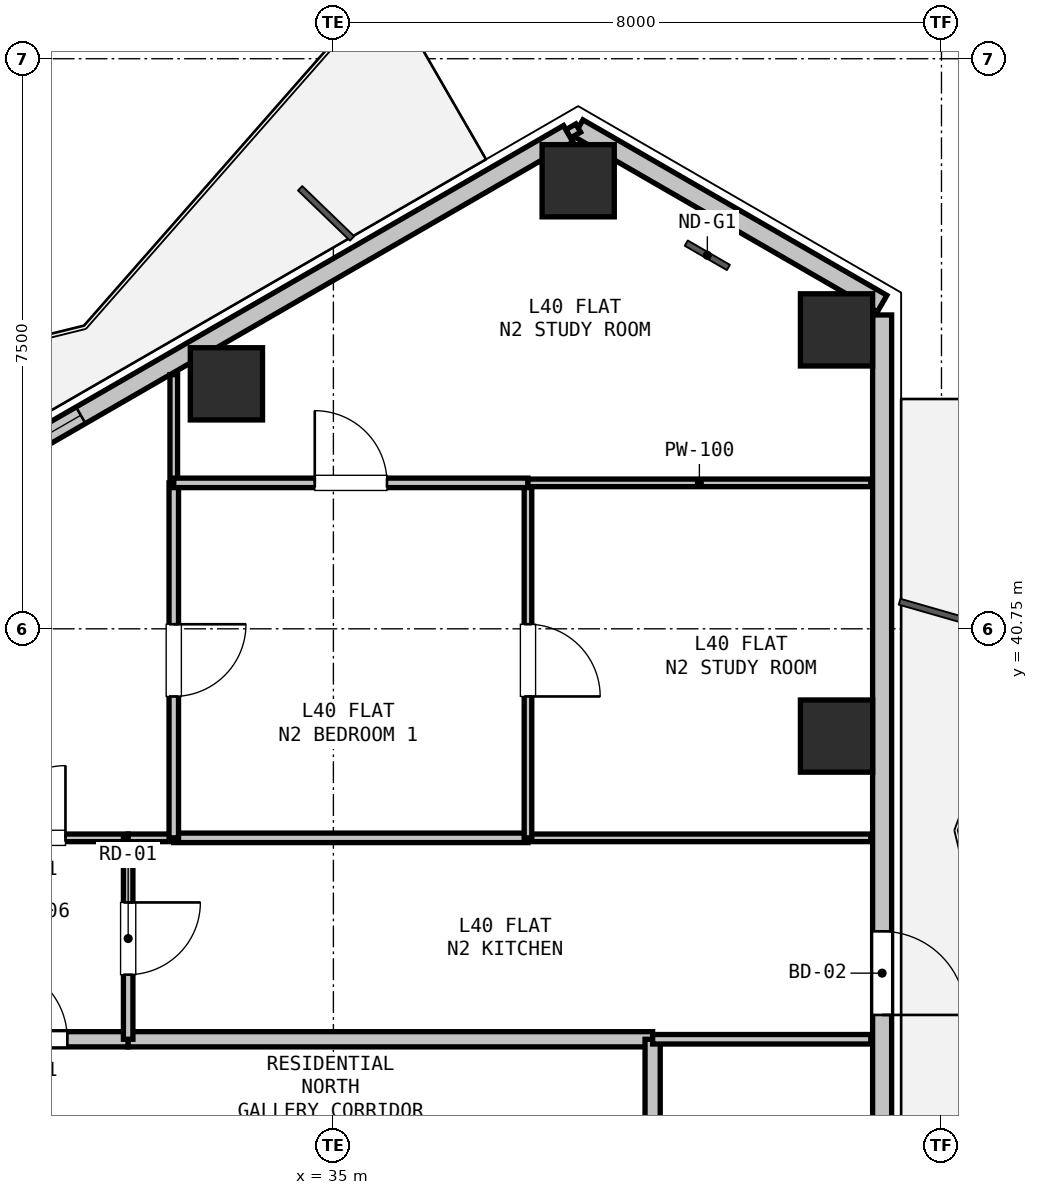
"""IFC4 building model, lengths in metres.
Left out: names, types, materials, properties, quantities, classifications, styles, units other than length and angle.
Written with IfcOpenShell. Run it as: python <this file> out.ifc"""

import sys

from ifc_helpers import new_model, si_unit, direction, frame, frame_2d, origin, origin_2d, place, context, subcontext, project, spatial, rectangle, hollow_rectangle, extrude, element, fill, save


model = new_model("IFC4")
c1 = context("Model", 3, precision=1e-05, world=origin(), true_north=direction((0.0, 1.0)))
c2 = subcontext(c1, "Body", "Model", "MODEL_VIEW")
j1 = project(units=[si_unit("LENGTHUNIT", "METRE"), si_unit("PLANEANGLEUNIT", "RADIAN")], contexts=[c1])
p1 = place(None, origin())
s1 = spatial("IfcSite", under=j1, at=p1, CompositionType="ELEMENT")
p2 = place(p1, origin())
s2 = spatial("IfcBuilding", under=s1, at=p2, CompositionType="ELEMENT")
p3 = place(p2, frame((0.0, 0.0, 144.3)))
s3 = spatial("IfcBuildingStorey", under=s2, at=p3, CompositionType="ELEMENT", Elevation=144.3)
for number, where, z_axis, x_axis in (
    (1, (33.593, 43.973, 0.0), (0.0, 0.0, 1.0), (1.0, 0.0, 0.0)),
    (2, (38.22, 46.645, 0.0), (0.0, 0.0, 1.0), (1.0, 0.0, 0.0)),
    (3, (41.619, 44.683, 0.0), (0.0, 0.0, 1.0), (1.0, 0.0, 0.0)),
    (4, (41.619, 39.339, 0.0), (0.0, 0.0, 1.0), (1.0, 0.0, 0.0)),
):
    element("IfcColumn", number, at=place(p3, frame(where, z_axis=z_axis, x_axis=x_axis)), inside=s3, PredefinedType="COLUMN", context=c2, shape_type="SweptSolid", body=[
        extrude(hollow_rectangle(XDim=0.95, YDim=0.95, WallThickness=0.028, at=origin_2d()), origin(), (0.0, 0.0, 1.0), 3.3),
    ])
p4 = place(p3, frame((38.22, 47.338, 0.0), z_axis=(0.0, 0.0, 1.0), x_axis=(0.866035021055, -0.499983342029, 0.0)))
e5 = element("IfcWall", 5, at=p4, inside=s3, PredefinedType="SOLIDWALL", context=c2, shape_type="SweptSolid", body=[
    extrude(rectangle(XDim=4.617, YDim=0.25, at=frame_2d((2.309, 0.0))), origin(), (0.0, 0.0, 1.0), 2.68),
])
p5 = place(p3, frame((28.403, 41.67, 0.0), z_axis=(0.0, 0.0, 1.0), x_axis=(0.86602239209, 0.500005216371, 0.0)))
e6 = element("IfcWall", 6, at=p5, inside=s3, PredefinedType="SOLIDWALL", context=c2, shape_type="SweptSolid", body=[
    extrude(rectangle(XDim=11.186, YDim=0.25, at=frame_2d((5.593, 0.0))), origin(), (0.0, 0.0, 1.0), 2.68),
])
p6 = place(p5, frame((2.88, 0.0, 0.9)))
e7 = element("IfcOpeningElement", 7, at=p6, cuts=e6, PredefinedType="OPENING", context=c2, shape_type="SweptSolid", body=[
    extrude(rectangle(XDim=0.9, YDim=1.4, at=frame_2d((0.45, 0.7))), frame((0.0, 0.135, 0.0), z_axis=(0.0, -1.0, 0.0), x_axis=(1.0, 0.0, 0.0)), (0.0, 0.0, 1.0), 0.27),
])
p7 = place(p3, frame((42.219, 44.879, 0.0), z_axis=(0.0, 0.0, 1.0), x_axis=(0.0, -1.0, 0.0)))
e8 = element("IfcWall", 8, at=p7, inside=s3, PredefinedType="SOLIDWALL", context=c2, shape_type="SweptSolid", body=[
    extrude(rectangle(XDim=11.186, YDim=0.25, at=frame_2d((5.593, 0.0))), origin(), (0.0, 0.0, 1.0), 2.68),
])
p8 = place(p7, frame((8.109, 0.0, 0.0)))
e9 = element("IfcOpeningElement", 9, at=p8, cuts=e8, PredefinedType="OPENING", context=c2, shape_type="SweptSolid", body=[
    extrude(rectangle(XDim=1.1, YDim=2.1, at=frame_2d((0.55, 1.05))), frame((0.0, 0.135, 0.0), z_axis=(0.0, -1.0, 0.0), x_axis=(1.0, 0.0, 0.0)), (0.0, 0.0, 1.0), 0.27),
])
p9 = place(p3, frame((29.7, 35.35, 0.0), z_axis=(0.0, 0.0, 1.0), x_axis=(1.0, 0.0, 0.0)))
e10 = element("IfcWall", 10, at=p9, inside=s3, PredefinedType="PARTITIONING", context=c2, shape_type="SweptSolid", body=[
    extrude(rectangle(XDim=2.6, YDim=0.2, at=frame_2d((1.3, 0.0))), origin(), (0.0, 0.0, 1.0), 3.06),
])
p10 = place(p9, frame((0.8, 0.0, 0.0)))
e11 = element("IfcOpeningElement", 11, at=p10, cuts=e10, PredefinedType="OPENING", context=c2, shape_type="SweptSolid", body=[
    extrude(rectangle(XDim=1.0, YDim=2.15, at=frame_2d((0.5, 1.075))), frame((0.0, 0.11, 0.0), z_axis=(0.0, -1.0, 0.0), x_axis=(1.0, 0.0, 0.0)), (0.0, 0.0, 1.0), 0.22),
])
p11 = place(p3, frame((32.3, 35.35, 0.0), z_axis=(0.0, 0.0, 1.0), x_axis=(1.0, 0.0, 0.0)))
e12 = element("IfcWall", 12, at=p11, inside=s3, PredefinedType="PARTITIONING", context=c2, shape_type="SweptSolid", body=[
    extrude(rectangle(XDim=6.9, YDim=0.2, at=frame_2d((3.45, 0.0))), origin(), (0.0, 0.0, 1.0), 2.433),
])
p12 = place(p3, frame((39.2, 35.35, 0.0), z_axis=(0.0, 0.0, 1.0), x_axis=(0.0, -1.0, 0.0)))
e13 = element("IfcWall", 13, at=p12, inside=s3, PredefinedType="PARTITIONING", context=c2, shape_type="SweptSolid", body=[
    extrude(rectangle(XDim=1.75, YDim=0.2, at=frame_2d((0.875, 0.0))), origin(), (0.0, 0.0, 1.0), 3.06),
])
p13 = place(p3, frame((29.7, 38.0, 0.0), z_axis=(0.0, 0.0, 1.0), x_axis=(1.0, 0.0, 0.0)))
e14 = element("IfcWall", 14, at=p13, inside=s3, PredefinedType="PARTITIONING", context=c2, shape_type="SweptSolid", body=[
    extrude(rectangle(XDim=2.6, YDim=0.1, at=frame_2d((1.3, 0.0))), origin(), (0.0, 0.0, 1.0), 3.06),
])
p14 = place(p13, frame((0.825, 0.0, 0.0)))
e15 = element("IfcOpeningElement", 15, at=p14, cuts=e14, PredefinedType="OPENING", context=c2, shape_type="SweptSolid", body=[
    extrude(rectangle(XDim=0.95, YDim=2.1, at=frame_2d((0.475, 1.05))), frame((0.0, 0.06, 0.0), z_axis=(0.0, -1.0, 0.0), x_axis=(1.0, 0.0, 0.0)), (0.0, 0.0, 1.0), 0.12),
])
p15 = place(p3, frame((32.3, 38.0, 0.0), z_axis=(0.0, 0.0, 1.0), x_axis=(0.0, -1.0, 0.0)))
e16 = element("IfcWall", 16, at=p15, inside=s3, PredefinedType="PARTITIONING", context=c2, shape_type="SweptSolid", body=[
    extrude(rectangle(XDim=2.65, YDim=0.125, at=frame_2d((1.325, 0.0))), origin(), (0.0, 0.0, 1.0), 3.06),
])
p16 = place(p15, frame((0.85, 0.0, 0.0)))
e17 = element("IfcOpeningElement", 17, at=p16, cuts=e16, PredefinedType="OPENING", context=c2, shape_type="SweptSolid", body=[
    extrude(rectangle(XDim=0.95, YDim=2.1, at=frame_2d((0.475, 1.05))), frame((0.0, 0.073, 0.0), z_axis=(0.0, -1.0, 0.0), x_axis=(1.0, 0.0, 0.0)), (0.0, 0.0, 1.0), 0.145),
])
p17 = place(p3, frame((42.07, 35.35, 0.0), z_axis=(0.0, 0.0, 1.0), x_axis=(-1.0, 0.0, 0.0)))
e18 = element("IfcWall", 18, at=p17, inside=s3, PredefinedType="PARTITIONING", context=c2, shape_type="SweptSolid", body=[
    extrude(rectangle(XDim=2.87, YDim=0.125, at=frame_2d((1.435, 0.0))), origin(), (0.0, 0.0, 1.0), 2.365),
])
p18 = place(p3, frame((32.3, 38.0, 0.0), z_axis=(0.0, 0.0, 1.0), x_axis=(1.0, 0.0, 0.0)))
e19 = element("IfcWall", 19, at=p18, inside=s3, PredefinedType="PARTITIONING", context=c2, shape_type="SweptSolid", body=[
    extrude(rectangle(XDim=0.6, YDim=0.1, at=frame_2d((0.3, 0.0))), origin(), (0.0, 0.0, 1.0), 3.06),
])
p19 = place(p3, frame((32.9, 38.0, 0.0), z_axis=(0.0, 0.0, 1.0), x_axis=(1.0, 0.0, 0.0)))
e20 = element("IfcWall", 20, at=p19, inside=s3, PredefinedType="PARTITIONING", context=c2, shape_type="SweptSolid", body=[
    extrude(rectangle(XDim=4.66, YDim=0.125, at=frame_2d((2.33, 0.0))), origin(), (0.0, 0.0, 1.0), 2.433),
])
p20 = place(p3, frame((37.56, 38.0, 0.0), z_axis=(0.0, 0.0, 1.0), x_axis=(1.0, 0.0, 0.0)))
e21 = element("IfcWall", 21, at=p20, inside=s3, PredefinedType="PARTITIONING", context=c2, shape_type="SweptSolid", body=[
    extrude(rectangle(XDim=4.51, YDim=0.1, at=frame_2d((2.255, 0.0))), origin(), (0.0, 0.0, 1.0), 2.365),
])
p21 = place(p3, frame((32.9, 44.094, 0.0), z_axis=(0.0, 0.0, 1.0), x_axis=(0.0, -1.0, 0.0)))
e22 = element("IfcWall", 22, at=p21, inside=s3, PredefinedType="PARTITIONING", context=c2, shape_type="SweptSolid", body=[
    extrude(rectangle(XDim=1.424, YDim=0.1, at=frame_2d((0.712, 0.0))), origin(), (0.0, 0.0, 1.0), 2.365),
])
p22 = place(p3, frame((32.9, 42.67, 0.0), z_axis=(0.0, 0.0, 1.0), x_axis=(0.0, -1.0, 0.0)))
e23 = element("IfcWall", 23, at=p22, inside=s3, PredefinedType="PARTITIONING", context=c2, shape_type="SweptSolid", body=[
    extrude(rectangle(XDim=4.67, YDim=0.125, at=frame_2d((2.335, 0.0))), origin(), (0.0, 0.0, 1.0), 3.06),
])
p23 = place(p22, frame((1.86, 0.0, 0.0)))
e24 = element("IfcOpeningElement", 24, at=p23, cuts=e23, PredefinedType="OPENING", context=c2, shape_type="SweptSolid", body=[
    extrude(rectangle(XDim=0.95, YDim=2.1, at=frame_2d((0.475, 1.05))), frame((0.0, 0.073, 0.0), z_axis=(0.0, -1.0, 0.0), x_axis=(1.0, 0.0, 0.0)), (0.0, 0.0, 1.0), 0.145),
])
p24 = place(p3, frame((37.56, 42.67, 0.0), z_axis=(0.0, 0.0, 1.0), x_axis=(0.0, -1.0, 0.0)))
e25 = element("IfcWall", 25, at=p24, inside=s3, PredefinedType="PARTITIONING", context=c2, shape_type="SweptSolid", body=[
    extrude(rectangle(XDim=4.67, YDim=0.1, at=frame_2d((2.335, 0.0))), origin(), (0.0, 0.0, 1.0), 2.433),
])
p25 = place(p24, frame((1.86, 0.0, 0.0)))
e26 = element("IfcOpeningElement", 26, at=p25, cuts=e25, PredefinedType="OPENING", context=c2, shape_type="SweptSolid", body=[
    extrude(rectangle(XDim=0.95, YDim=2.1, at=frame_2d((0.475, 1.05))), frame((0.0, 0.06, 0.0), z_axis=(0.0, -1.0, 0.0), x_axis=(1.0, 0.0, 0.0)), (0.0, 0.0, 1.0), 0.12),
])
p26 = place(p3, frame((32.9, 42.67, 0.0), z_axis=(0.0, 0.0, 1.0), x_axis=(1.0, 0.0, 0.0)))
e27 = element("IfcWall", 27, at=p26, inside=s3, PredefinedType="PARTITIONING", context=c2, shape_type="SweptSolid", body=[
    extrude(rectangle(XDim=4.66, YDim=0.125, at=frame_2d((2.33, 0.0))), origin(), (0.0, 0.0, 1.0), 2.433),
])
p27 = place(p26, frame((1.855, 0.0, 0.0)))
e28 = element("IfcOpeningElement", 28, at=p27, cuts=e27, PredefinedType="OPENING", context=c2, shape_type="SweptSolid", body=[
    extrude(rectangle(XDim=0.95, YDim=2.1, at=frame_2d((0.475, 1.05))), frame((0.0, 0.073, 0.0), z_axis=(0.0, -1.0, 0.0), x_axis=(1.0, 0.0, 0.0)), (0.0, 0.0, 1.0), 0.145),
])
p28 = place(p3, frame((37.56, 42.67, 0.0), z_axis=(0.0, 0.0, 1.0), x_axis=(1.0, 0.0, 0.0)))
e29 = element("IfcWall", 29, at=p28, inside=s3, PredefinedType="PARTITIONING", context=c2, shape_type="SweptSolid", body=[
    extrude(rectangle(XDim=4.51, YDim=0.1, at=frame_2d((2.255, 0.0))), origin(), (0.0, 0.0, 1.0), 2.433),
])
p29 = place(p3, frame((38.091, 47.263, 0.0), z_axis=(0.0, 0.0, 1.0), x_axis=(0.865833797362, 0.500331725305, 0.0)))
e30 = element("IfcWall", 30, at=p29, inside=s3, PredefinedType="PARTITIONING", context=c2, shape_type="SweptSolid", body=[
    extrude(rectangle(XDim=0.15, YDim=0.125, at=frame_2d((0.075, 0.0))), origin(), (0.0, 0.0, 1.0), 3.06),
])
p30 = place(p6, origin())
e31 = element("IfcWindow", 31, at=p30, inside=s3, PartitioningType="SINGLE_PANEL", PredefinedType="WINDOW", context=c2, shape_type="SweptSolid", body=[
    extrude(rectangle(XDim=0.9, YDim=1.4, at=frame_2d((0.45, 0.7))), frame((0.0, 0.03, 0.0), z_axis=(0.0, -1.0, 0.0), x_axis=(1.0, 0.0, 0.0)), (0.0, 0.0, 1.0), 0.06),
])
fill(e7, e31)
p31 = place(p8, origin())
e32 = element("IfcDoor", 32, at=p31, inside=s3, OperationType="SINGLE_SWING_RIGHT", PredefinedType="DOOR", context=c2, shape_type="SweptSolid", body=[
    extrude(rectangle(XDim=1.1, YDim=2.1, at=frame_2d((0.55, 1.05))), frame((0.0, 0.025, 0.0), z_axis=(0.0, -1.0, 0.0), x_axis=(1.0, 0.0, 0.0)), (0.0, 0.0, 1.0), 0.05),
])
fill(e9, e32)
p32 = place(p10, origin())
e33 = element("IfcDoor", 33, at=p32, inside=s3, OperationType="SINGLE_SWING_LEFT", PredefinedType="DOOR", context=c2, shape_type="SweptSolid", body=[
    extrude(rectangle(XDim=1.0, YDim=2.15, at=frame_2d((0.5, 1.075))), frame((0.0, 0.025, 0.0), z_axis=(0.0, -1.0, 0.0), x_axis=(1.0, 0.0, 0.0)), (0.0, 0.0, 1.0), 0.05),
])
fill(e11, e33)
p33 = place(p16, origin())
e34 = element("IfcDoor", 34, at=p33, inside=s3, OperationType="SINGLE_SWING_LEFT", PredefinedType="DOOR", context=c2, shape_type="SweptSolid", body=[
    extrude(rectangle(XDim=0.95, YDim=2.1, at=frame_2d((0.475, 1.05))), frame((0.0, 0.025, 0.0), z_axis=(0.0, -1.0, 0.0), x_axis=(1.0, 0.0, 0.0)), (0.0, 0.0, 1.0), 0.05),
])
fill(e17, e34)
p34 = place(p14, origin())
e35 = element("IfcDoor", 35, at=p34, inside=s3, OperationType="SINGLE_SWING_RIGHT", PredefinedType="DOOR", context=c2, shape_type="SweptSolid", body=[
    extrude(rectangle(XDim=0.95, YDim=2.1, at=frame_2d((0.475, 1.05))), frame((0.0, 0.025, 0.0), z_axis=(0.0, -1.0, 0.0), x_axis=(1.0, 0.0, 0.0)), (0.0, 0.0, 1.0), 0.05),
])
fill(e15, e35)
p35 = place(p23, origin())
e36 = element("IfcDoor", 36, at=p35, inside=s3, OperationType="SINGLE_SWING_LEFT", PredefinedType="DOOR", context=c2, shape_type="SweptSolid", body=[
    extrude(rectangle(XDim=0.95, YDim=2.1, at=frame_2d((0.475, 1.05))), frame((0.0, 0.025, 0.0), z_axis=(0.0, -1.0, 0.0), x_axis=(1.0, 0.0, 0.0)), (0.0, 0.0, 1.0), 0.05),
])
fill(e24, e36)
p36 = place(p25, origin())
e37 = element("IfcDoor", 37, at=p36, inside=s3, OperationType="SINGLE_SWING_RIGHT", PredefinedType="DOOR", context=c2, shape_type="SweptSolid", body=[
    extrude(rectangle(XDim=0.95, YDim=2.1, at=frame_2d((0.475, 1.05))), frame((0.0, 0.025, 0.0), z_axis=(0.0, -1.0, 0.0), x_axis=(1.0, 0.0, 0.0)), (0.0, 0.0, 1.0), 0.05),
])
fill(e26, e37)
p37 = place(p27, origin())
e38 = element("IfcDoor", 38, at=p37, inside=s3, OperationType="SINGLE_SWING_LEFT", PredefinedType="DOOR", context=c2, shape_type="SweptSolid", body=[
    extrude(rectangle(XDim=0.95, YDim=2.1, at=frame_2d((0.475, 1.05))), frame((0.0, 0.025, 0.0), z_axis=(0.0, -1.0, 0.0), x_axis=(1.0, 0.0, 0.0)), (0.0, 0.0, 1.0), 0.05),
])
fill(e28, e38)
save(model, sys.argv[1])
